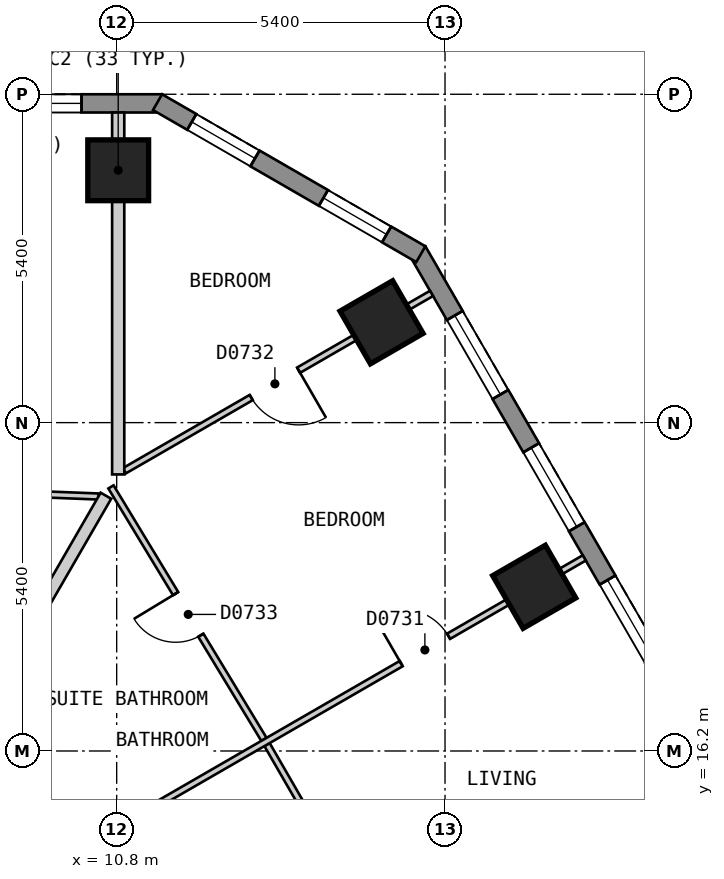
"""IFC4 building model, lengths in metres.
Left out: names, types, materials, properties, quantities, classifications, styles, units other than length and angle.
Written with IfcOpenShell. Run it as: python <this file> out.ifc"""

import sys

from ifc_helpers import new_model, si_unit, direction, frame, frame_2d, origin, origin_2d, place, context, subcontext, project, spatial, polyline, rectangle, outline, extrude, element, fill, save


model = new_model("IFC4")
c1 = context("Model", 3, precision=1e-05, world=origin(), true_north=direction((0.0, 1.0)))
c2 = subcontext(c1, "Body", "Model", "MODEL_VIEW")
j1 = project(units=[si_unit("LENGTHUNIT", "METRE"), si_unit("PLANEANGLEUNIT", "RADIAN")], contexts=[c1])
p1 = place(None, origin())
s1 = spatial("IfcSite", under=j1, at=p1, CompositionType="ELEMENT")
p2 = place(p1, origin())
s2 = spatial("IfcBuilding", under=s1, at=p2, CompositionType="ELEMENT")
p3 = place(p2, frame((0.0, 0.0, 93.0)))
s3 = spatial("IfcBuildingStorey", under=s2, at=p3, CompositionType="ELEMENT", Elevation=93.0)
for number, where, z_axis, x_axis in (
    (1, (10.825, 25.75, 0.0), (0.0, 0.0, 1.0), (-1.0, 0.0, 0.0)),
    (2, (17.667, 18.9, 0.0), (0.0, 0.0, 1.0), (-0.5, 0.866, 0.0)),
    (3, (15.156, 23.25, 0.0), (0.0, 0.0, 1.0), (-0.5, 0.866, 0.0)),
):
    element("IfcColumn", number, at=place(p3, frame(where, z_axis=z_axis, x_axis=x_axis)), inside=s3, PredefinedType="COLUMN", context=c2, shape_type="SweptSolid", body=[
        extrude(rectangle(XDim=1.0, YDim=1.0, at=origin_2d()), origin(), (0.0, 0.0, 1.0), 3.0),
    ])
p4 = place(p3, frame((11.547, 26.85, 0.0), z_axis=(0.0, 0.0, 1.0), x_axis=(-1.0, 0.0, 0.0)))
e4 = element("IfcWall", 4, at=p4, inside=s3, PredefinedType="SOLIDWALL", context=c2, shape_type="SweptSolid", body=[
    extrude(outline(polyline([(0.0, -0.15), (23.094, -0.15), (23.014, 0.15), (0.08, 0.15), (0.0, -0.15)])), origin(), (0.0, 0.0, 1.0), 2.7),
])
p5 = place(p4, frame((1.325, 0.0, 0.15)))
e5 = element("IfcOpeningElement", 5, at=p5, cuts=e4, PredefinedType="OPENING", context=c2, shape_type="SweptSolid", body=[
    extrude(rectangle(XDim=1.5, YDim=2.1, at=frame_2d((0.75, 1.05))), frame((0.0, 0.16, 0.0), z_axis=(0.0, -1.0, 0.0), x_axis=(1.0, 0.0, 0.0)), (0.0, 0.0, 1.0), 0.32),
])
p6 = place(p4, frame((4.032, 0.0, 0.15)))
e6 = element("IfcOpeningElement", 6, at=p6, cuts=e4, PredefinedType="OPENING", context=c2, shape_type="SweptSolid", body=[
    extrude(rectangle(XDim=1.5, YDim=2.1, at=frame_2d((0.75, 1.05))), frame((0.0, 0.16, 0.0), z_axis=(0.0, -1.0, 0.0), x_axis=(1.0, 0.0, 0.0)), (0.0, 0.0, 1.0), 0.32),
])
p7 = place(p4, frame((6.738, 0.0, 0.15)))
e7 = element("IfcOpeningElement", 7, at=p7, cuts=e4, PredefinedType="OPENING", context=c2, shape_type="SweptSolid", body=[
    extrude(rectangle(XDim=1.5, YDim=2.1, at=frame_2d((0.75, 1.05))), frame((0.0, 0.16, 0.0), z_axis=(0.0, -1.0, 0.0), x_axis=(1.0, 0.0, 0.0)), (0.0, 0.0, 1.0), 0.32),
])
p8 = place(p4, frame((9.445, 0.0, 0.15)))
e8 = element("IfcOpeningElement", 8, at=p8, cuts=e4, PredefinedType="OPENING", context=c2, shape_type="SweptSolid", body=[
    extrude(rectangle(XDim=1.5, YDim=2.1, at=frame_2d((0.75, 1.05))), frame((0.0, 0.16, 0.0), z_axis=(0.0, -1.0, 0.0), x_axis=(1.0, 0.0, 0.0)), (0.0, 0.0, 1.0), 0.32),
])
p9 = place(p4, frame((12.151, 0.0, 0.15)))
e9 = element("IfcOpeningElement", 9, at=p9, cuts=e4, PredefinedType="OPENING", context=c2, shape_type="SweptSolid", body=[
    extrude(rectangle(XDim=1.5, YDim=2.1, at=frame_2d((0.75, 1.05))), frame((0.0, 0.16, 0.0), z_axis=(0.0, -1.0, 0.0), x_axis=(1.0, 0.0, 0.0)), (0.0, 0.0, 1.0), 0.32),
])
p10 = place(p4, frame((14.858, 0.0, 0.15)))
e10 = element("IfcOpeningElement", 10, at=p10, cuts=e4, PredefinedType="OPENING", context=c2, shape_type="SweptSolid", body=[
    extrude(rectangle(XDim=1.5, YDim=2.1, at=frame_2d((0.75, 1.05))), frame((0.0, 0.16, 0.0), z_axis=(0.0, -1.0, 0.0), x_axis=(1.0, 0.0, 0.0)), (0.0, 0.0, 1.0), 0.32),
])
p11 = place(p4, frame((17.564, 0.0, 0.15)))
e11 = element("IfcOpeningElement", 11, at=p11, cuts=e4, PredefinedType="OPENING", context=c2, shape_type="SweptSolid", body=[
    extrude(rectangle(XDim=1.5, YDim=2.1, at=frame_2d((0.75, 1.05))), frame((0.0, 0.16, 0.0), z_axis=(0.0, -1.0, 0.0), x_axis=(1.0, 0.0, 0.0)), (0.0, 0.0, 1.0), 0.32),
])
p12 = place(p4, frame((20.271, 0.0, 0.15)))
e12 = element("IfcOpeningElement", 12, at=p12, cuts=e4, PredefinedType="OPENING", context=c2, shape_type="SweptSolid", body=[
    extrude(rectangle(XDim=1.5, YDim=2.1, at=frame_2d((0.75, 1.05))), frame((0.0, 0.16, 0.0), z_axis=(0.0, -1.0, 0.0), x_axis=(1.0, 0.0, 0.0)), (0.0, 0.0, 1.0), 0.32),
])
p13 = place(p3, frame((29.027, 1.425, 0.0), z_axis=(0.0, 0.0, 1.0), x_axis=(-0.500027479704, 0.866009537788, 0.0)))
e13 = element("IfcWall", 13, at=p13, inside=s3, PredefinedType="SOLIDWALL", context=c2, shape_type="SweptSolid", body=[
    extrude(outline(polyline([(0.0, -0.15), (26.559, -0.15), (26.478, 0.15), (0.08, 0.15), (0.0, -0.15)])), origin(), (0.0, 0.0, 1.0), 2.7),
])
p14 = place(p13, frame((1.227, 0.0, 0.15)))
e14 = element("IfcOpeningElement", 14, at=p14, cuts=e13, PredefinedType="OPENING", context=c2, shape_type="SweptSolid", body=[
    extrude(rectangle(XDim=1.5, YDim=2.1, at=frame_2d((0.75, 1.05))), frame((0.0, 0.16, 0.0), z_axis=(0.0, -1.0, 0.0), x_axis=(1.0, 0.0, 0.0)), (0.0, 0.0, 1.0), 0.32),
])
p15 = place(p13, frame((3.738, 0.0, 0.15)))
e15 = element("IfcOpeningElement", 15, at=p15, cuts=e13, PredefinedType="OPENING", context=c2, shape_type="SweptSolid", body=[
    extrude(rectangle(XDim=1.5, YDim=2.1, at=frame_2d((0.75, 1.05))), frame((0.0, 0.16, 0.0), z_axis=(0.0, -1.0, 0.0), x_axis=(1.0, 0.0, 0.0)), (0.0, 0.0, 1.0), 0.32),
])
p16 = place(p13, frame((6.25, 0.0, 0.15)))
e16 = element("IfcOpeningElement", 16, at=p16, cuts=e13, PredefinedType="OPENING", context=c2, shape_type="SweptSolid", body=[
    extrude(rectangle(XDim=1.5, YDim=2.1, at=frame_2d((0.75, 1.05))), frame((0.0, 0.16, 0.0), z_axis=(0.0, -1.0, 0.0), x_axis=(1.0, 0.0, 0.0)), (0.0, 0.0, 1.0), 0.32),
])
p17 = place(p13, frame((8.761, 0.0, 0.15)))
e17 = element("IfcOpeningElement", 17, at=p17, cuts=e13, PredefinedType="OPENING", context=c2, shape_type="SweptSolid", body=[
    extrude(rectangle(XDim=1.5, YDim=2.1, at=frame_2d((0.75, 1.05))), frame((0.0, 0.16, 0.0), z_axis=(0.0, -1.0, 0.0), x_axis=(1.0, 0.0, 0.0)), (0.0, 0.0, 1.0), 0.32),
])
p18 = place(p13, frame((11.273, 0.0, 0.15)))
e18 = element("IfcOpeningElement", 18, at=p18, cuts=e13, PredefinedType="OPENING", context=c2, shape_type="SweptSolid", body=[
    extrude(rectangle(XDim=1.5, YDim=2.1, at=frame_2d((0.75, 1.05))), frame((0.0, 0.16, 0.0), z_axis=(0.0, -1.0, 0.0), x_axis=(1.0, 0.0, 0.0)), (0.0, 0.0, 1.0), 0.32),
])
p19 = place(p13, frame((13.785, 0.0, 0.15)))
e19 = element("IfcOpeningElement", 19, at=p19, cuts=e13, PredefinedType="OPENING", context=c2, shape_type="SweptSolid", body=[
    extrude(rectangle(XDim=1.5, YDim=2.1, at=frame_2d((0.75, 1.05))), frame((0.0, 0.16, 0.0), z_axis=(0.0, -1.0, 0.0), x_axis=(1.0, 0.0, 0.0)), (0.0, 0.0, 1.0), 0.32),
])
p20 = place(p13, frame((16.296, 0.0, 0.15)))
e20 = element("IfcOpeningElement", 20, at=p20, cuts=e13, PredefinedType="OPENING", context=c2, shape_type="SweptSolid", body=[
    extrude(rectangle(XDim=1.5, YDim=2.1, at=frame_2d((0.75, 1.05))), frame((0.0, 0.16, 0.0), z_axis=(0.0, -1.0, 0.0), x_axis=(1.0, 0.0, 0.0)), (0.0, 0.0, 1.0), 0.32),
])
p21 = place(p13, frame((18.807, 0.0, 0.15)))
e21 = element("IfcOpeningElement", 21, at=p21, cuts=e13, PredefinedType="OPENING", context=c2, shape_type="SweptSolid", body=[
    extrude(rectangle(XDim=1.5, YDim=2.1, at=frame_2d((0.75, 1.05))), frame((0.0, 0.16, 0.0), z_axis=(0.0, -1.0, 0.0), x_axis=(1.0, 0.0, 0.0)), (0.0, 0.0, 1.0), 0.32),
])
p22 = place(p13, frame((21.319, 0.0, 0.15)))
e22 = element("IfcOpeningElement", 22, at=p22, cuts=e13, PredefinedType="OPENING", context=c2, shape_type="SweptSolid", body=[
    extrude(rectangle(XDim=1.5, YDim=2.1, at=frame_2d((0.75, 1.05))), frame((0.0, 0.16, 0.0), z_axis=(0.0, -1.0, 0.0), x_axis=(1.0, 0.0, 0.0)), (0.0, 0.0, 1.0), 0.32),
])
p23 = place(p13, frame((23.831, 0.0, 0.15)))
e23 = element("IfcOpeningElement", 23, at=p23, cuts=e13, PredefinedType="OPENING", context=c2, shape_type="SweptSolid", body=[
    extrude(rectangle(XDim=1.5, YDim=2.1, at=frame_2d((0.75, 1.05))), frame((0.0, 0.16, 0.0), z_axis=(0.0, -1.0, 0.0), x_axis=(1.0, 0.0, 0.0)), (0.0, 0.0, 1.0), 0.32),
])
p24 = place(p3, frame((15.802, 24.37, 0.0), z_axis=(0.0, 0.0, 1.0), x_axis=(-0.866022959057, 0.500004234368, 0.0)))
e24 = element("IfcWall", 24, at=p24, inside=s3, PredefinedType="SOLIDWALL", context=c2, shape_type="SweptSolid", body=[
    extrude(outline(polyline([(0.0, -0.15), (5.0, -0.15), (4.92, 0.15), (0.08, 0.15), (0.0, -0.15)])), origin(), (0.0, 0.0, 1.0), 2.7),
])
p25 = place(p24, frame((0.65, 0.0, 0.15)))
e25 = element("IfcOpeningElement", 25, at=p25, cuts=e24, PredefinedType="OPENING", context=c2, shape_type="SweptSolid", body=[
    extrude(rectangle(XDim=1.2, YDim=2.1, at=frame_2d((0.6, 1.05))), frame((0.0, 0.16, 0.0), z_axis=(0.0, -1.0, 0.0), x_axis=(1.0, 0.0, 0.0)), (0.0, 0.0, 1.0), 0.32),
])
p26 = place(p24, frame((3.15, 0.0, 0.15)))
e26 = element("IfcOpeningElement", 26, at=p26, cuts=e24, PredefinedType="OPENING", context=c2, shape_type="SweptSolid", body=[
    extrude(rectangle(XDim=1.2, YDim=2.1, at=frame_2d((0.6, 1.05))), frame((0.0, 0.16, 0.0), z_axis=(0.0, -1.0, 0.0), x_axis=(1.0, 0.0, 0.0)), (0.0, 0.0, 1.0), 0.32),
])
p27 = place(p3, frame((8.488, 16.5, 0.0), z_axis=(0.0, 0.0, 1.0), x_axis=(0.499986836607, -0.86603300354, 0.0)))
e27 = element("IfcWall", 27, at=p27, inside=s3, PredefinedType="PARTITIONING", context=c2, shape_type="SweptSolid", body=[
    extrude(rectangle(XDim=20.09, YDim=0.2, at=frame_2d((10.045, 0.0))), origin(), (0.0, 0.0, 1.0), 2.7),
])
p28 = place(p27, frame((14.569, 0.0, 0.0)))
e28 = element("IfcOpeningElement", 28, at=p28, cuts=e27, PredefinedType="OPENING", context=c2, shape_type="SweptSolid", body=[
    extrude(rectangle(XDim=1.0, YDim=2.1, at=frame_2d((0.5, 1.05))), frame((0.0, 0.11, 0.0), z_axis=(0.0, -1.0, 0.0), x_axis=(1.0, 0.0, 0.0)), (0.0, 0.0, 1.0), 0.22),
])
p29 = place(p27, frame((4.547, 0.0, 0.0)))
e29 = element("IfcOpeningElement", 29, at=p29, cuts=e27, PredefinedType="OPENING", context=c2, shape_type="SweptSolid", body=[
    extrude(rectangle(XDim=1.0, YDim=2.1, at=frame_2d((0.5, 1.05))), frame((0.0, 0.11, 0.0), z_axis=(0.0, -1.0, 0.0), x_axis=(1.0, 0.0, 0.0)), (0.0, 0.0, 1.0), 0.22),
])
p30 = place(p3, frame((10.706, 20.543, 0.0), z_axis=(0.0, 0.0, 1.0), x_axis=(0.518240414093, -0.855234981278, 0.0)))
e30 = element("IfcWall", 30, at=p30, inside=s3, PredefinedType="PARTITIONING", context=c2, shape_type="SweptSolid", body=[
    extrude(rectangle(XDim=4.855, YDim=0.1, at=frame_2d((2.427, 0.0))), origin(), (0.0, 0.0, 1.0), 2.7),
])
p31 = place(p30, frame((2.052, 0.0, 0.0)))
e31 = element("IfcOpeningElement", 31, at=p31, cuts=e30, PredefinedType="OPENING", context=c2, shape_type="SweptSolid", body=[
    extrude(rectangle(XDim=0.8, YDim=2.1, at=frame_2d((0.4, 1.05))), frame((0.0, 0.06, 0.0), z_axis=(0.0, -1.0, 0.0), x_axis=(1.0, 0.0, 0.0)), (0.0, 0.0, 1.0), 0.12),
])
p32 = place(p3, frame((13.273, 16.305, 0.0), z_axis=(0.0, 0.0, 1.0), x_axis=(0.500093956194, -0.865971151354, 0.0)))
e32 = element("IfcWall", 32, at=p32, inside=s3, PredefinedType="PARTITIONING", context=c2, shape_type="SweptSolid", body=[
    extrude(rectangle(XDim=4.873, YDim=0.1, at=frame_2d((2.437, 0.0))), origin(), (0.0, 0.0, 1.0), 2.7),
])
p33 = place(p32, frame((1.987, 0.0, 0.0)))
e33 = element("IfcOpeningElement", 33, at=p33, cuts=e32, PredefinedType="OPENING", context=c2, shape_type="SweptSolid", body=[
    extrude(rectangle(XDim=0.9, YDim=2.1, at=frame_2d((0.45, 1.05))), frame((0.0, 0.06, 0.0), z_axis=(0.0, -1.0, 0.0), x_axis=(1.0, 0.0, 0.0)), (0.0, 0.0, 1.0), 0.12),
])
p34 = place(p3, frame((8.06, 20.48, 0.0), z_axis=(0.0, 0.0, 1.0), x_axis=(0.999243345912, -0.038893902497, 0.0)))
e34 = element("IfcWall", 34, at=p34, inside=s3, PredefinedType="PARTITIONING", context=c2, shape_type="SweptSolid", body=[
    extrude(rectangle(XDim=2.442, YDim=0.1, at=frame_2d((1.221, 0.0))), origin(), (0.0, 0.0, 1.0), 2.7),
])
p35 = place(p3, frame((9.83, 14.375, 0.0), z_axis=(0.0, 0.0, 1.0), x_axis=(0.866016855193, 0.500014806302, 0.0)))
e35 = element("IfcWall", 35, at=p35, inside=s3, PredefinedType="PARTITIONING", context=c2, shape_type="SweptSolid", body=[
    extrude(rectangle(XDim=10.0, YDim=0.1, at=frame_2d((5.0, 0.0))), origin(), (0.0, 0.0, 1.0), 2.7),
])
p36 = place(p35, frame((6.523, 0.0, 0.0)))
e36 = element("IfcOpeningElement", 36, at=p36, cuts=e35, PredefinedType="OPENING", context=c2, shape_type="SweptSolid", body=[
    extrude(rectangle(XDim=0.9, YDim=2.1, at=frame_2d((0.45, 1.05))), frame((0.0, 0.06, 0.0), z_axis=(0.0, -1.0, 0.0), x_axis=(1.0, 0.0, 0.0)), (0.0, 0.0, 1.0), 0.12),
])
p37 = place(p3, frame((10.926, 20.808, 0.0), z_axis=(0.0, 0.0, 1.0), x_axis=(0.86600925905, 0.500027962457, 0.0)))
e37 = element("IfcWall", 37, at=p37, inside=s3, PredefinedType="PARTITIONING", context=c2, shape_type="SweptSolid", body=[
    extrude(rectangle(XDim=5.834, YDim=0.1, at=frame_2d((2.917, 0.0))), origin(), (0.0, 0.0, 1.0), 2.7),
])
p38 = place(p37, frame((2.409, 0.0, 0.0)))
e38 = element("IfcOpeningElement", 38, at=p38, cuts=e37, PredefinedType="OPENING", context=c2, shape_type="SweptSolid", body=[
    extrude(rectangle(XDim=0.9, YDim=2.1, at=frame_2d((0.45, 1.05))), frame((0.0, 0.06, 0.0), z_axis=(0.0, -1.0, 0.0), x_axis=(1.0, 0.0, 0.0)), (0.0, 0.0, 1.0), 0.12),
])
p39 = place(p3, frame((8.43, 16.6, 0.0), z_axis=(0.0, 0.0, 1.0), x_axis=(0.500072613115, 0.865983476524, 0.0)))
e39 = element("IfcWall", 39, at=p39, inside=s3, PredefinedType="PARTITIONING", context=c2, shape_type="SweptSolid", body=[
    extrude(rectangle(XDim=4.385, YDim=0.2, at=frame_2d((2.193, 0.0))), origin(), (0.0, 0.0, 1.0), 2.7),
])
p40 = place(p3, frame((10.825, 20.748, 0.0), z_axis=(0.0, 0.0, 1.0), x_axis=(0.0, 1.0, 0.0)))
e40 = element("IfcWall", 40, at=p40, inside=s3, PredefinedType="PARTITIONING", context=c2, shape_type="SweptSolid", body=[
    extrude(rectangle(XDim=5.952, YDim=0.2, at=frame_2d((2.976, 0.0))), origin(), (0.0, 0.0, 1.0), 2.7),
])
p41 = place(p5, origin())
e41 = element("IfcWindow", 41, at=p41, inside=s3, PartitioningType="SINGLE_PANEL", PredefinedType="WINDOW", context=c2, shape_type="SweptSolid", body=[
    extrude(rectangle(XDim=1.5, YDim=2.1, at=frame_2d((0.75, 1.05))), frame((0.0, 0.03, 0.0), z_axis=(0.0, -1.0, 0.0), x_axis=(1.0, 0.0, 0.0)), (0.0, 0.0, 1.0), 0.06),
])
fill(e5, e41)
p42 = place(p21, origin())
e42 = element("IfcWindow", 42, at=p42, inside=s3, PartitioningType="SINGLE_PANEL", PredefinedType="WINDOW", context=c2, shape_type="SweptSolid", body=[
    extrude(rectangle(XDim=1.5, YDim=2.1, at=frame_2d((0.75, 1.05))), frame((0.0, 0.03, 0.0), z_axis=(0.0, -1.0, 0.0), x_axis=(1.0, 0.0, 0.0)), (0.0, 0.0, 1.0), 0.06),
])
fill(e21, e42)
p43 = place(p22, origin())
e43 = element("IfcWindow", 43, at=p43, inside=s3, PartitioningType="SINGLE_PANEL", PredefinedType="WINDOW", context=c2, shape_type="SweptSolid", body=[
    extrude(rectangle(XDim=1.5, YDim=2.1, at=frame_2d((0.75, 1.05))), frame((0.0, 0.03, 0.0), z_axis=(0.0, -1.0, 0.0), x_axis=(1.0, 0.0, 0.0)), (0.0, 0.0, 1.0), 0.06),
])
fill(e22, e43)
p44 = place(p23, origin())
e44 = element("IfcWindow", 44, at=p44, inside=s3, PartitioningType="SINGLE_PANEL", PredefinedType="WINDOW", context=c2, shape_type="SweptSolid", body=[
    extrude(rectangle(XDim=1.5, YDim=2.1, at=frame_2d((0.75, 1.05))), frame((0.0, 0.03, 0.0), z_axis=(0.0, -1.0, 0.0), x_axis=(1.0, 0.0, 0.0)), (0.0, 0.0, 1.0), 0.06),
])
fill(e23, e44)
p45 = place(p25, origin())
e45 = element("IfcWindow", 45, at=p45, inside=s3, PartitioningType="SINGLE_PANEL", PredefinedType="WINDOW", context=c2, shape_type="SweptSolid", body=[
    extrude(rectangle(XDim=1.2, YDim=2.1, at=frame_2d((0.6, 1.05))), frame((0.0, 0.03, 0.0), z_axis=(0.0, -1.0, 0.0), x_axis=(1.0, 0.0, 0.0)), (0.0, 0.0, 1.0), 0.06),
])
fill(e25, e45)
p46 = place(p26, origin())
e46 = element("IfcWindow", 46, at=p46, inside=s3, PartitioningType="SINGLE_PANEL", PredefinedType="WINDOW", context=c2, shape_type="SweptSolid", body=[
    extrude(rectangle(XDim=1.2, YDim=2.1, at=frame_2d((0.6, 1.05))), frame((0.0, 0.03, 0.0), z_axis=(0.0, -1.0, 0.0), x_axis=(1.0, 0.0, 0.0)), (0.0, 0.0, 1.0), 0.06),
])
fill(e26, e46)
p47 = place(p36, origin())
e47 = element("IfcDoor", 47, at=p47, inside=s3, OperationType="SINGLE_SWING_LEFT", PredefinedType="DOOR", context=c2, shape_type="SweptSolid", body=[
    extrude(rectangle(XDim=0.9, YDim=2.1, at=frame_2d((0.45, 1.05))), frame((0.0, 0.025, 0.0), z_axis=(0.0, -1.0, 0.0), x_axis=(1.0, 0.0, 0.0)), (0.0, 0.0, 1.0), 0.05),
])
fill(e36, e47)
p48 = place(p38, origin())
e48 = element("IfcDoor", 48, at=p48, inside=s3, OperationType="SINGLE_SWING_RIGHT", PredefinedType="DOOR", context=c2, shape_type="SweptSolid", body=[
    extrude(rectangle(XDim=0.9, YDim=2.1, at=frame_2d((0.45, 1.05))), frame((0.0, 0.025, 0.0), z_axis=(0.0, -1.0, 0.0), x_axis=(1.0, 0.0, 0.0)), (0.0, 0.0, 1.0), 0.05),
])
fill(e38, e48)
p49 = place(p31, origin())
e49 = element("IfcDoor", 49, at=p49, inside=s3, OperationType="SINGLE_SWING_LEFT", PredefinedType="DOOR", context=c2, shape_type="SweptSolid", body=[
    extrude(rectangle(XDim=0.8, YDim=2.1, at=frame_2d((0.4, 1.05))), frame((0.0, 0.025, 0.0), z_axis=(0.0, -1.0, 0.0), x_axis=(1.0, 0.0, 0.0)), (0.0, 0.0, 1.0), 0.05),
])
fill(e31, e49)
save(model, sys.argv[1])
